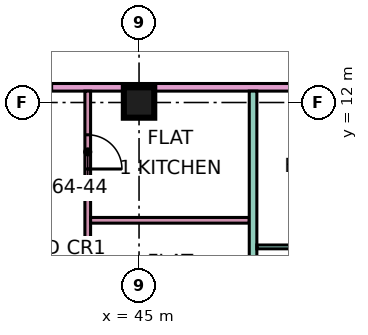
"""IFC4 building model, lengths in metres.
Left out: names, types, materials, properties, quantities, classifications, styles, units other than length and angle.
Written with IfcOpenShell. Run it as: python <this file> out.ifc"""

import sys

from ifc_helpers import new_model, si_unit, direction, frame, frame_2d, origin, origin_2d, place, context, subcontext, project, spatial, rectangle, extrude, element, fill, save


model = new_model("IFC4")
c1 = context("Model", 3, precision=1e-05, world=origin(), true_north=direction((0.0, 1.0)))
c2 = subcontext(c1, "Body", "Model", "MODEL_VIEW")
j1 = project(units=[si_unit("LENGTHUNIT", "METRE"), si_unit("PLANEANGLEUNIT", "RADIAN")], contexts=[c1])
p1 = place(None, origin())
s1 = spatial("IfcSite", under=j1, at=p1, CompositionType="ELEMENT")
p2 = place(p1, origin())
s2 = spatial("IfcBuilding", under=s1, at=p2, CompositionType="ELEMENT")
p3 = place(p2, frame((0.0, 0.0, 277.15)))
s3 = spatial("IfcBuildingStorey", under=s2, at=p3, CompositionType="ELEMENT", Elevation=277.15)
p4 = place(p3, frame((45.0, 12.0, 0.0), z_axis=(0.0, 0.0, 1.0), x_axis=(1.0, 0.0, 0.0)))
e1 = element("IfcColumn", 1, at=p4, inside=s3, PredefinedType="COLUMN", context=c2, shape_type="SweptSolid", body=[
    extrude(rectangle(XDim=0.8, YDim=0.8, at=origin_2d()), origin(), (0.0, 0.0, 1.0), 3.75),
])
p5 = place(p3, frame((40.65, 12.4, 0.0), z_axis=(0.0, 0.0, 1.0), x_axis=(1.0, 0.0, 0.0)))
e2 = element("IfcWall", 2, at=p5, inside=s3, PredefinedType="PARTITIONING", context=c2, shape_type="SweptSolid", body=[
    extrude(rectangle(XDim=22.35, YDim=0.2, at=frame_2d((11.175, 0.0))), origin(), (0.0, 0.0, 1.0), 3.35),
])
p6 = place(p5, frame((14.25, 0.0, 0.0)))
e3 = element("IfcOpeningElement", 3, at=p6, cuts=e2, PredefinedType="OPENING", context=c2, shape_type="SweptSolid", body=[
    extrude(rectangle(XDim=1.0, YDim=2.1, at=frame_2d((0.5, 1.05))), frame((0.0, 0.11, 0.0), z_axis=(0.0, -1.0, 0.0), x_axis=(1.0, 0.0, 0.0)), (0.0, 0.0, 1.0), 0.22),
])
p7 = place(p5, frame((1.05, 0.0, 0.0)))
e4 = element("IfcOpeningElement", 4, at=p7, cuts=e2, PredefinedType="OPENING", context=c2, shape_type="SweptSolid", body=[
    extrude(rectangle(XDim=1.0, YDim=2.1, at=frame_2d((0.5, 1.05))), frame((0.0, 0.11, 0.0), z_axis=(0.0, -1.0, 0.0), x_axis=(1.0, 0.0, 0.0)), (0.0, 0.0, 1.0), 0.22),
])
p8 = place(p3, frame((43.65, 5.825, 0.0), z_axis=(0.0, 0.0, 1.0), x_axis=(0.0, 1.0, 0.0)))
e5 = element("IfcWall", 5, at=p8, inside=s3, PredefinedType="PARTITIONING", context=c2, shape_type="SweptSolid", body=[
    extrude(rectangle(XDim=6.475, YDim=0.15, at=frame_2d((3.238, 0.0))), origin(), (0.0, 0.0, 1.0), 3.35),
])
p9 = place(p8, frame((4.425, 0.0, 0.0)))
e6 = element("IfcOpeningElement", 6, at=p9, cuts=e5, PredefinedType="OPENING", context=c2, shape_type="SweptSolid", body=[
    extrude(rectangle(XDim=0.9, YDim=2.1, at=frame_2d((0.45, 1.05))), frame((0.0, 0.085, 0.0), z_axis=(0.0, -1.0, 0.0), x_axis=(1.0, 0.0, 0.0)), (0.0, 0.0, 1.0), 0.17),
])
p10 = place(p3, frame((43.725, 8.9, 0.0), z_axis=(0.0, 0.0, 1.0), x_axis=(1.0, 0.0, 0.0)))
e7 = element("IfcWall", 7, at=p10, inside=s3, PredefinedType="PARTITIONING", context=c2, shape_type="SweptSolid", body=[
    extrude(rectangle(XDim=4.175, YDim=0.15, at=frame_2d((2.087, 0.0))), origin(), (0.0, 0.0, 1.0), 3.35),
])
p11 = place(p3, frame((48.0, 0.0, 0.0), z_axis=(0.0, 0.0, 1.0), x_axis=(0.0, 1.0, 0.0)))
e8 = element("IfcWall", 8, at=p11, inside=s3, PredefinedType="PARTITIONING", context=c2, shape_type="SweptSolid", body=[
    extrude(rectangle(XDim=12.3, YDim=0.2, at=frame_2d((6.15, 0.0))), origin(), (0.0, 0.0, 1.0), 3.35),
])
p12 = place(p3, frame((48.1, 8.2, 0.0), z_axis=(0.0, 0.0, 1.0), x_axis=(1.0, 0.0, 0.0)))
e9 = element("IfcWall", 9, at=p12, inside=s3, PredefinedType="PARTITIONING", context=c2, shape_type="SweptSolid", body=[
    extrude(rectangle(XDim=5.65, YDim=0.1, at=frame_2d((2.825, 0.0))), origin(), (0.0, 0.0, 1.0), 3.35),
])
p13 = place(p9, frame((0.9, 0.0, 0.0), z_axis=(0.0, 0.0, 1.0), x_axis=(-1.0, 0.0, 0.0)))
e10 = element("IfcDoor", 10, at=p13, inside=s3, OperationType="SINGLE_SWING_LEFT", PredefinedType="DOOR", context=c2, shape_type="SweptSolid", body=[
    extrude(rectangle(XDim=0.9, YDim=2.1, at=frame_2d((0.45, 1.05))), frame((0.0, 0.025, 0.0), z_axis=(0.0, -1.0, 0.0), x_axis=(1.0, 0.0, 0.0)), (0.0, 0.0, 1.0), 0.05),
])
fill(e6, e10)
save(model, sys.argv[1])
